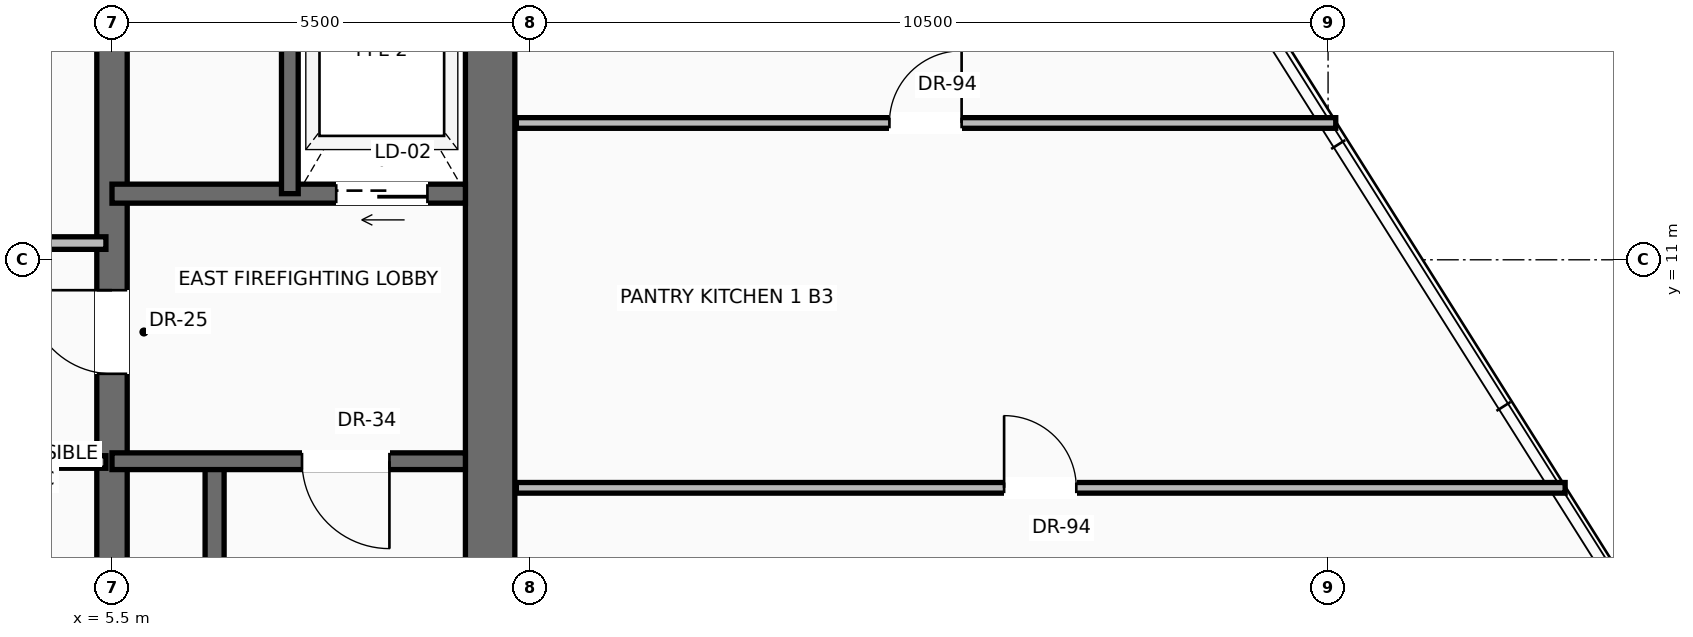
"""IFC4 building model, lengths in metres.
Left out: names, types, materials, properties, quantities, classifications, styles, units other than length and angle.
Written with IfcOpenShell. Run it as: python <this file> out.ifc"""

import sys

from ifc_helpers import new_model, si_unit, direction, frame, frame_2d, origin, place, context, subcontext, project, spatial, rectangle, extrude, source, transform, mapped, element, fill, save


model = new_model("IFC4")
c1 = context("Model", 3, precision=1e-05, world=origin(), true_north=direction((0.0, 1.0)))
c2 = subcontext(c1, "Body", "Model", "MODEL_VIEW")
j1 = project(units=[si_unit("LENGTHUNIT", "METRE"), si_unit("PLANEANGLEUNIT", "RADIAN")], contexts=[c1])
p1 = place(None, origin())
s1 = spatial("IfcSite", under=j1, at=p1, CompositionType="ELEMENT")
p2 = place(p1, origin())
s2 = spatial("IfcBuilding", under=s1, at=p2, CompositionType="ELEMENT")
p3 = place(p2, frame((0.0, 0.0, 211.7)))
s3 = spatial("IfcBuildingStorey", under=s2, at=p3, CompositionType="ELEMENT", Elevation=211.7)
p4 = place(p3, frame((10.475, 0.525, 0.0), z_axis=(0.0, 0.0, 1.0), x_axis=(0.0, 1.0, 0.0)))
e1 = element("IfcWall", 1, at=p4, inside=s3, PredefinedType="SHEAR", context=c2, shape_type="SweptSolid", body=[
    extrude(rectangle(XDim=15.55, YDim=0.65, at=frame_2d((7.775, 0.0))), origin(), (0.0, 0.0, 1.0), 3.42),
])
p5 = place(p3, frame((5.5, 0.525, 0.0), z_axis=(0.0, 0.0, 1.0), x_axis=(0.0, 1.0, 0.0)))
e2 = element("IfcWall", 2, at=p5, inside=s3, PredefinedType="SHEAR", context=c2, shape_type="SweptSolid", body=[
    extrude(rectangle(XDim=15.55, YDim=0.4, at=frame_2d((7.775, 0.0))), origin(), (0.0, 0.0, 1.0), 3.42),
])
p6 = place(p5, frame((8.975, 0.0, 0.0)))
e3 = element("IfcOpeningElement", 3, at=p6, cuts=e2, PredefinedType="OPENING", context=c2, shape_type="SweptSolid", body=[
    extrude(rectangle(XDim=1.1, YDim=2.2, at=frame_2d((0.55, 1.1))), frame((0.0, 0.21, 0.0), z_axis=(0.0, -1.0, 0.0), x_axis=(1.0, 0.0, 0.0)), (0.0, 0.0, 1.0), 0.42),
])
p7 = place(p3, frame((6.85, 0.85, 0.0), z_axis=(0.0, 0.0, 1.0), x_axis=(0.0, 1.0, 0.0)))
e4 = element("IfcWall", 4, at=p7, inside=s3, PredefinedType="SOLIDWALL", context=c2, shape_type="SweptSolid", body=[
    extrude(rectangle(XDim=7.5, YDim=0.25, at=frame_2d((3.75, 0.0))), origin(), (0.0, 0.0, 1.0), 3.42),
])
p8 = place(p3, frame((10.15, 8.35, 0.0), z_axis=(0.0, 0.0, 1.0), x_axis=(-1.0, 0.0, 0.0)))
e5 = element("IfcWall", 5, at=p8, inside=s3, PredefinedType="SOLIDWALL", context=c2, shape_type="SweptSolid", body=[
    extrude(rectangle(XDim=4.65, YDim=0.22, at=frame_2d((2.325, 0.0))), origin(), (0.0, 0.0, 1.0), 3.42),
])
p9 = place(p8, frame((1.0, 0.0, 0.0)))
e6 = element("IfcOpeningElement", 6, at=p9, cuts=e5, PredefinedType="OPENING", context=c2, shape_type="SweptSolid", body=[
    extrude(rectangle(XDim=1.15, YDim=2.2, at=frame_2d((0.575, 1.1))), frame((0.0, 0.12, 0.0), z_axis=(0.0, -1.0, 0.0), x_axis=(1.0, 0.0, 0.0)), (0.0, 0.0, 1.0), 0.24),
])
p10 = place(p3, frame((10.15, 11.87, 0.0), z_axis=(0.0, 0.0, 1.0), x_axis=(-1.0, 0.0, 0.0)))
e7 = element("IfcWall", 7, at=p10, inside=s3, PredefinedType="SOLIDWALL", context=c2, shape_type="SweptSolid", body=[
    extrude(rectangle(XDim=4.65, YDim=0.25, at=frame_2d((2.325, 0.0))), origin(), (0.0, 0.0, 1.0), 3.42),
])
p11 = place(p10, frame((0.5, 0.0, 0.0)))
e8 = element("IfcOpeningElement", 8, at=p11, cuts=e7, PredefinedType="OPENING", context=c2, shape_type="SweptSolid", body=[
    extrude(rectangle(XDim=1.2, YDim=2.25, at=frame_2d((0.6, 1.125))), frame((0.0, 0.135, 0.0), z_axis=(0.0, -1.0, 0.0), x_axis=(1.0, 0.0, 0.0)), (0.0, 0.0, 1.0), 0.27),
])
p12 = place(p3, frame((7.84, 11.87, 0.0), z_axis=(0.0, 0.0, 1.0), x_axis=(0.0, 1.0, 0.0)))
e9 = element("IfcWall", 9, at=p12, inside=s3, PredefinedType="SOLIDWALL", context=c2, shape_type="SweptSolid", body=[
    extrude(rectangle(XDim=3.88, YDim=0.22, at=frame_2d((1.94, 0.0))), origin(), (0.0, 0.0, 1.0), 3.42),
])
for number, where, z_axis, x_axis in (
    (10, (3.54, 8.34, 0.0), (0.0, 0.0, 1.0), (1.0, 0.0, 0.0)),
    (11, (3.54, 11.22, 0.0), (0.0, 0.0, 1.0), (1.0, 0.0, 0.0)),
):
    element("IfcWall", number, at=place(p3, frame(where, z_axis=z_axis, x_axis=x_axis)), inside=s3, PredefinedType="PARTITIONING", context=c2, shape_type="SweptSolid", body=[
        extrude(rectangle(XDim=1.88, YDim=0.165, at=frame_2d((0.94, 0.0))), origin(), (0.0, 0.0, 1.0), 3.412),
    ])
p13 = place(p3, frame((10.82, 8.0, 0.0), z_axis=(0.0, 0.0, 1.0), x_axis=(1.0, 0.0, 0.0)))
e12 = element("IfcWall", 12, at=p13, inside=s3, PredefinedType="PARTITIONING", context=c2, shape_type="SweptSolid", body=[
    extrude(rectangle(XDim=13.799, YDim=0.14, at=frame_2d((6.899, 0.0))), origin(), (0.0, 0.0, 1.0), 3.412),
])
p14 = place(p13, frame((6.417, 0.0, 0.0)))
e13 = element("IfcOpeningElement", 13, at=p14, cuts=e12, PredefinedType="OPENING", context=c2, shape_type="SweptSolid", body=[
    extrude(rectangle(XDim=0.95, YDim=2.2, at=frame_2d((0.475, 1.1))), frame((0.0, 0.08, 0.0), z_axis=(0.0, -1.0, 0.0), x_axis=(1.0, 0.0, 0.0)), (0.0, 0.0, 1.0), 0.16),
])
p15 = place(p3, frame((10.82, 12.8, 0.0), z_axis=(0.0, 0.0, 1.0), x_axis=(1.0, 0.0, 0.0)))
e14 = element("IfcWall", 14, at=p15, inside=s3, PredefinedType="PARTITIONING", context=c2, shape_type="SweptSolid", body=[
    extrude(rectangle(XDim=10.781, YDim=0.14, at=frame_2d((5.391, 0.0))), origin(), (0.0, 0.0, 1.0), 3.412),
])
p16 = place(p15, frame((4.908, 0.0, 0.0)))
e15 = element("IfcOpeningElement", 15, at=p16, cuts=e14, PredefinedType="OPENING", context=c2, shape_type="SweptSolid", body=[
    extrude(rectangle(XDim=0.95, YDim=2.2, at=frame_2d((0.475, 1.1))), frame((0.0, 0.08, 0.0), z_axis=(0.0, -1.0, 0.0), x_axis=(1.0, 0.0, 0.0)), (0.0, 0.0, 1.0), 0.16),
])
m1 = source(origin(), c2, "Body", "SweptSolid", [
    extrude(rectangle(XDim=1.15, YDim=2.2, at=frame_2d((0.575, 1.1))), frame((0.0, 0.025, 0.0), z_axis=(0.0, -1.0, 0.0), x_axis=(1.0, 0.0, 0.0)), (0.0, 0.0, 1.0), 0.05),
])
p17 = place(p9, origin())
e16 = element("IfcDoor", 16, at=p17, inside=s3, OperationType="SINGLE_SWING_LEFT", PredefinedType="DOOR", context=c2, shape_type="MappedRepresentation", body=[
    mapped(m1, transform((0.0, 0.0, 0.0), scale=1.0)),
])
fill(e6, e16)
m2 = source(origin(), c2, "Body", "SweptSolid", [
    extrude(rectangle(XDim=1.1, YDim=2.2, at=frame_2d((0.55, 1.1))), frame((0.0, 0.025, 0.0), z_axis=(0.0, -1.0, 0.0), x_axis=(1.0, 0.0, 0.0)), (0.0, 0.0, 1.0), 0.05),
])
p18 = place(p6, origin())
e17 = element("IfcDoor", 17, at=p18, inside=s3, OperationType="SINGLE_SWING_RIGHT", PredefinedType="DOOR", context=c2, shape_type="MappedRepresentation", body=[
    mapped(m2, transform((0.0, 0.0, 0.0), scale=1.0)),
])
fill(e3, e17)
m3 = source(origin(), c2, "Body", "SweptSolid", [
    extrude(rectangle(XDim=1.2, YDim=2.25, at=frame_2d((0.6, 1.125))), frame((0.0, 0.025, 0.0), z_axis=(0.0, -1.0, 0.0), x_axis=(1.0, 0.0, 0.0)), (0.0, 0.0, 1.0), 0.05),
])
p19 = place(p11, origin())
e18 = element("IfcDoor", 18, at=p19, inside=s3, OperationType="SLIDING_TO_RIGHT", PredefinedType="DOOR", context=c2, shape_type="MappedRepresentation", body=[
    mapped(m3, transform((0.0, 0.0, 0.0), scale=1.0)),
])
fill(e8, e18)
m4 = source(origin(), c2, "Body", "SweptSolid", [
    extrude(rectangle(XDim=0.95, YDim=2.2, at=frame_2d((0.475, 1.1))), frame((0.0, 0.025, 0.0), z_axis=(0.0, -1.0, 0.0), x_axis=(1.0, 0.0, 0.0)), (0.0, 0.0, 1.0), 0.05),
])
p20 = place(p16, origin())
e19 = element("IfcDoor", 19, at=p20, inside=s3, OperationType="SINGLE_SWING_RIGHT", PredefinedType="DOOR", context=c2, shape_type="MappedRepresentation", body=[
    mapped(m4, transform((0.0, 0.0, 0.0), scale=1.0)),
])
fill(e15, e19)
p21 = place(p14, origin())
e20 = element("IfcDoor", 20, at=p21, inside=s3, OperationType="SINGLE_SWING_LEFT", PredefinedType="DOOR", context=c2, shape_type="MappedRepresentation", body=[
    mapped(m4, transform((0.0, 0.0, 0.0), scale=1.0)),
])
fill(e13, e20)
save(model, sys.argv[1])
